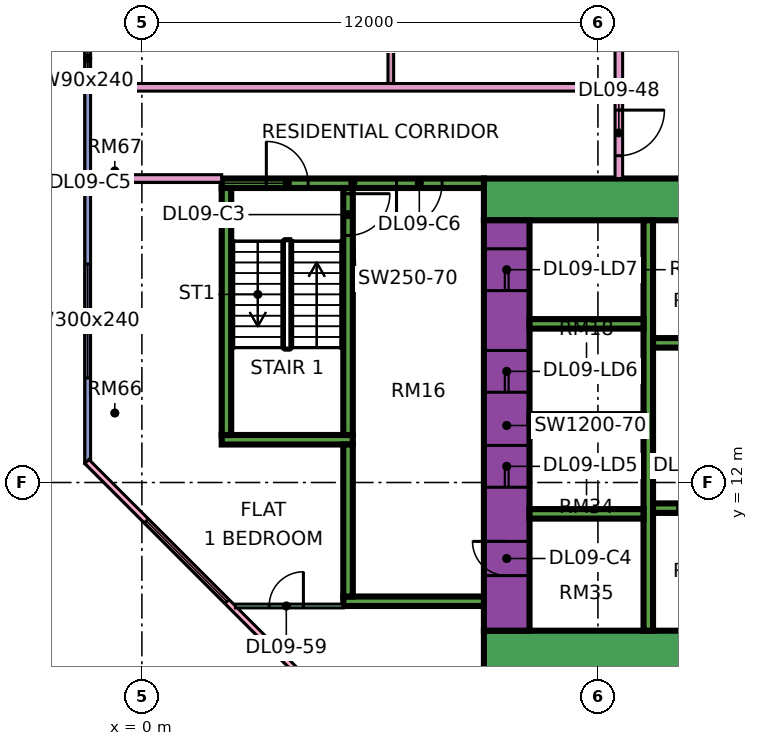
"""IFC4 building model, lengths in metres.
Left out: names, types, materials, properties, quantities, classifications, styles, units other than length and angle.
Written with IfcOpenShell. Run it as: python <this file> out.ifc"""

import sys

from ifc_helpers import new_model, si_unit, direction, frame, frame_2d, origin, place, context, subcontext, project, spatial, rectangle, extrude, element, fill, save


model = new_model("IFC4")
c1 = context("Model", 3, precision=1e-05, world=origin(), true_north=direction((0.0, 1.0)))
c2 = subcontext(c1, "Body", "Model", "MODEL_VIEW")
j1 = project(units=[si_unit("LENGTHUNIT", "METRE"), si_unit("PLANEANGLEUNIT", "RADIAN")], contexts=[c1])
p1 = place(None, origin())
s1 = spatial("IfcSite", under=j1, at=p1, CompositionType="ELEMENT")
p2 = place(p1, origin())
s2 = spatial("IfcBuilding", under=s1, at=p2, CompositionType="ELEMENT")
p3 = place(p2, frame((0.0, 0.0, 48.9)))
s3 = spatial("IfcBuildingStorey", under=s2, at=p3, CompositionType="ELEMENT", Elevation=48.9)
p4 = place(p3, frame((9.0, 7.55, 0.0), z_axis=(0.0, 0.0, 1.0), x_axis=(1.0, 0.0, 0.0)))
e1 = element("IfcWall", 1, at=p4, inside=s3, PredefinedType="SHEAR", context=c2, shape_type="SweptSolid", body=[
    extrude(rectangle(XDim=25.0, YDim=1.1, at=frame_2d((12.5, 0.0))), origin(), (0.0, 0.0, 1.0), 3.75),
])
p5 = place(p3, frame((9.0, 19.45, 0.0), z_axis=(0.0, 0.0, 1.0), x_axis=(1.0, 0.0, 0.0)))
e2 = element("IfcWall", 2, at=p5, inside=s3, PredefinedType="SHEAR", context=c2, shape_type="SweptSolid", body=[
    extrude(rectangle(XDim=25.0, YDim=1.1, at=frame_2d((12.5, 0.0))), origin(), (0.0, 0.0, 1.0), 3.75),
])
p6 = place(p5, frame((19.1, 0.0, 0.0)))
e3 = element("IfcOpeningElement", 3, at=p6, cuts=e2, PredefinedType="OPENING", context=c2, shape_type="SweptSolid", body=[
    extrude(rectangle(XDim=1.8, YDim=2.4, at=frame_2d((0.9, 1.2))), frame((0.0, 0.56, 0.0), z_axis=(0.0, -1.0, 0.0), x_axis=(1.0, 0.0, 0.0)), (0.0, 0.0, 1.0), 1.12),
])
p7 = place(p3, frame((9.6, 8.1, 0.0), z_axis=(0.0, 0.0, 1.0), x_axis=(0.0, 1.0, 0.0)))
e4 = element("IfcWall", 4, at=p7, inside=s3, PredefinedType="SHEAR", context=c2, shape_type="SweptSolid", body=[
    extrude(rectangle(XDim=10.8, YDim=1.2, at=frame_2d((5.4, 0.0))), origin(), (0.0, 0.0, 1.0), 3.75),
])
p8 = place(p7, frame((3.775, 0.0, 0.0)))
e5 = element("IfcOpeningElement", 5, at=p8, cuts=e4, PredefinedType="OPENING", context=c2, shape_type="SweptSolid", body=[
    extrude(rectangle(XDim=1.1, YDim=2.2, at=frame_2d((0.55, 1.1))), frame((0.0, 0.61, 0.0), z_axis=(0.0, -1.0, 0.0), x_axis=(1.0, 0.0, 0.0)), (0.0, 0.0, 1.0), 1.22),
])
p9 = place(p7, frame((6.275, 0.0, 0.0)))
e6 = element("IfcOpeningElement", 6, at=p9, cuts=e4, PredefinedType="OPENING", context=c2, shape_type="SweptSolid", body=[
    extrude(rectangle(XDim=1.1, YDim=2.2, at=frame_2d((0.55, 1.1))), frame((0.0, 0.61, 0.0), z_axis=(0.0, -1.0, 0.0), x_axis=(1.0, 0.0, 0.0)), (0.0, 0.0, 1.0), 1.22),
])
p10 = place(p7, frame((8.95, 0.0, 0.0)))
e7 = element("IfcOpeningElement", 7, at=p10, cuts=e4, PredefinedType="OPENING", context=c2, shape_type="SweptSolid", body=[
    extrude(rectangle(XDim=1.1, YDim=2.2, at=frame_2d((0.55, 1.1))), frame((0.0, 0.61, 0.0), z_axis=(0.0, -1.0, 0.0), x_axis=(1.0, 0.0, 0.0)), (0.0, 0.0, 1.0), 1.22),
])
p11 = place(p7, frame((1.45, 0.0, 0.0)))
e8 = element("IfcOpeningElement", 8, at=p11, cuts=e4, PredefinedType="OPENING", context=c2, shape_type="SweptSolid", body=[
    extrude(rectangle(XDim=0.9, YDim=2.1, at=frame_2d((0.45, 1.05))), frame((0.0, 0.61, 0.0), z_axis=(0.0, -1.0, 0.0), x_axis=(1.0, 0.0, 0.0)), (0.0, 0.0, 1.0), 1.22),
])
p12 = place(p3, frame((13.325, 8.1, 0.0), z_axis=(0.0, 0.0, 1.0), x_axis=(0.0, 1.0, 0.0)))
e9 = element("IfcWall", 9, at=p12, inside=s3, PredefinedType="SHEAR", context=c2, shape_type="SweptSolid", body=[
    extrude(rectangle(XDim=10.8, YDim=0.25, at=frame_2d((5.4, 0.0))), origin(), (0.0, 0.0, 1.0), 3.75),
])
p13 = place(p3, frame((13.45, 11.325, 0.0), z_axis=(0.0, 0.0, 1.0), x_axis=(1.0, 0.0, 0.0)))
e10 = element("IfcWall", 10, at=p13, inside=s3, PredefinedType="SHEAR", context=c2, shape_type="SweptSolid", body=[
    extrude(rectangle(XDim=19.45, YDim=0.25, at=frame_2d((9.725, 0.0))), origin(), (0.0, 0.0, 1.0), 3.75),
])
p14 = place(p13, frame((0.65, 0.0, 0.0)))
e11 = element("IfcOpeningElement", 11, at=p14, cuts=e10, PredefinedType="OPENING", context=c2, shape_type="SweptSolid", body=[
    extrude(rectangle(XDim=1.2, YDim=2.2, at=frame_2d((0.6, 1.1))), frame((0.0, 0.135, 0.0), z_axis=(0.0, -1.0, 0.0), x_axis=(1.0, 0.0, 0.0)), (0.0, 0.0, 1.0), 0.27),
])
p15 = place(p13, frame((3.4, 0.0, 0.0)))
e12 = element("IfcOpeningElement", 12, at=p15, cuts=e10, PredefinedType="OPENING", context=c2, shape_type="SweptSolid", body=[
    extrude(rectangle(XDim=1.2, YDim=2.2, at=frame_2d((0.6, 1.1))), frame((0.0, 0.135, 0.0), z_axis=(0.0, -1.0, 0.0), x_axis=(1.0, 0.0, 0.0)), (0.0, 0.0, 1.0), 0.27),
])
p16 = place(p13, frame((6.15, 0.0, 0.0)))
e13 = element("IfcOpeningElement", 13, at=p16, cuts=e10, PredefinedType="OPENING", context=c2, shape_type="SweptSolid", body=[
    extrude(rectangle(XDim=1.2, YDim=2.2, at=frame_2d((0.6, 1.1))), frame((0.0, 0.135, 0.0), z_axis=(0.0, -1.0, 0.0), x_axis=(1.0, 0.0, 0.0)), (0.0, 0.0, 1.0), 0.27),
])
p17 = place(p13, frame((8.9, 0.0, 0.0)))
e14 = element("IfcOpeningElement", 14, at=p17, cuts=e10, PredefinedType="OPENING", context=c2, shape_type="SweptSolid", body=[
    extrude(rectangle(XDim=1.2, YDim=2.2, at=frame_2d((0.6, 1.1))), frame((0.0, 0.135, 0.0), z_axis=(0.0, -1.0, 0.0), x_axis=(1.0, 0.0, 0.0)), (0.0, 0.0, 1.0), 0.27),
])
p18 = place(p3, frame((13.45, 15.675, 0.0), z_axis=(0.0, 0.0, 1.0), x_axis=(1.0, 0.0, 0.0)))
e15 = element("IfcWall", 15, at=p18, inside=s3, PredefinedType="SHEAR", context=c2, shape_type="SweptSolid", body=[
    extrude(rectangle(XDim=13.75, YDim=0.25, at=frame_2d((6.875, 0.0))), origin(), (0.0, 0.0, 1.0), 3.75),
])
for number, where, z_axis, x_axis in (
    (16, (10.2, 11.175, 0.0), (0.0, 0.0, 1.0), (1.0, 0.0, 0.0)),
    (17, (10.2, 13.675, 0.0), (0.0, 0.0, 1.0), (1.0, 0.0, 0.0)),
    (18, (10.2, 16.175, 0.0), (0.0, 0.0, 1.0), (1.0, 0.0, 0.0)),
):
    element("IfcWall", number, at=place(p3, frame(where, z_axis=z_axis, x_axis=x_axis)), inside=s3, PredefinedType="SHEAR", context=c2, shape_type="SweptSolid", body=[
        extrude(rectangle(XDim=3.0, YDim=0.25, at=frame_2d((1.5, 0.0))), origin(), (0.0, 0.0, 1.0), 3.75),
    ])
p19 = place(p3, frame((2.1, 19.875, 0.0), z_axis=(0.0, 0.0, 1.0), x_axis=(1.0, 0.0, 0.0)))
e19 = element("IfcWall", 19, at=p19, inside=s3, PredefinedType="SHEAR", context=c2, shape_type="SweptSolid", body=[
    extrude(rectangle(XDim=6.9, YDim=0.25, at=frame_2d((3.45, 0.0))), origin(), (0.0, 0.0, 1.0), 3.75),
])
p20 = place(p19, frame((1.175, 0.0, 0.0)))
e20 = element("IfcOpeningElement", 20, at=p20, cuts=e19, PredefinedType="OPENING", context=c2, shape_type="SweptSolid", body=[
    extrude(rectangle(XDim=1.1, YDim=2.2, at=frame_2d((0.55, 1.1))), frame((0.0, 0.135, 0.0), z_axis=(0.0, -1.0, 0.0), x_axis=(1.0, 0.0, 0.0)), (0.0, 0.0, 1.0), 0.27),
])
p21 = place(p19, frame((4.6, 0.0, 0.0)))
e21 = element("IfcOpeningElement", 21, at=p21, cuts=e19, PredefinedType="OPENING", context=c2, shape_type="SweptSolid", body=[
    extrude(rectangle(XDim=1.2, YDim=2.2, at=frame_2d((0.6, 1.1))), frame((0.0, 0.135, 0.0), z_axis=(0.0, -1.0, 0.0), x_axis=(1.0, 0.0, 0.0)), (0.0, 0.0, 1.0), 0.27),
])
p22 = place(p3, frame((2.1, 13.125, 0.0), z_axis=(0.0, 0.0, 1.0), x_axis=(1.0, 0.0, 0.0)))
e22 = element("IfcWall", 22, at=p22, inside=s3, PredefinedType="SHEAR", context=c2, shape_type="SweptSolid", body=[
    extrude(rectangle(XDim=3.45, YDim=0.25, at=frame_2d((1.725, 0.0))), origin(), (0.0, 0.0, 1.0), 3.75),
])
p23 = place(p3, frame((2.225, 13.25, 0.0), z_axis=(0.0, 0.0, 1.0), x_axis=(0.0, 1.0, 0.0)))
e23 = element("IfcWall", 23, at=p23, inside=s3, PredefinedType="SHEAR", context=c2, shape_type="SweptSolid", body=[
    extrude(rectangle(XDim=6.5, YDim=0.25, at=frame_2d((3.25, 0.0))), origin(), (0.0, 0.0, 1.0), 3.75),
])
p24 = place(p3, frame((5.425, 13.25, 0.0), z_axis=(0.0, 0.0, 1.0), x_axis=(0.0, 1.0, 0.0)))
e24 = element("IfcWall", 24, at=p24, inside=s3, PredefinedType="SHEAR", context=c2, shape_type="SweptSolid", body=[
    extrude(rectangle(XDim=6.5, YDim=0.25, at=frame_2d((3.25, 0.0))), origin(), (0.0, 0.0, 1.0), 3.75),
])
p25 = place(p24, frame((5.25, 0.0, 0.0)))
e25 = element("IfcOpeningElement", 25, at=p25, cuts=e24, PredefinedType="OPENING", context=c2, shape_type="SweptSolid", body=[
    extrude(rectangle(XDim=1.1, YDim=2.2, at=frame_2d((0.55, 1.1))), frame((0.0, 0.135, 0.0), z_axis=(0.0, -1.0, 0.0), x_axis=(1.0, 0.0, 0.0)), (0.0, 0.0, 1.0), 0.27),
])
p26 = place(p3, frame((5.3, 8.875, 0.0), z_axis=(0.0, 0.0, 1.0), x_axis=(1.0, 0.0, 0.0)))
e26 = element("IfcWall", 26, at=p26, inside=s3, PredefinedType="SHEAR", context=c2, shape_type="SweptSolid", body=[
    extrude(rectangle(XDim=3.7, YDim=0.25, at=frame_2d((1.85, 0.0))), origin(), (0.0, 0.0, 1.0), 3.75),
])
p27 = place(p3, frame((5.425, 9.0, 0.0), z_axis=(0.0, 0.0, 1.0), x_axis=(0.0, 1.0, 0.0)))
e27 = element("IfcWall", 27, at=p27, inside=s3, PredefinedType="SHEAR", context=c2, shape_type="SweptSolid", body=[
    extrude(rectangle(XDim=4.0, YDim=0.25, at=frame_2d((2.0, 0.0))), origin(), (0.0, 0.0, 1.0), 3.75),
])
p28 = place(p3, frame((-1.425, 23.925, 0.0), z_axis=(0.0, 0.0, 1.0), x_axis=(0.0, -1.0, 0.0)))
e28 = element("IfcWall", 28, at=p28, inside=s3, PredefinedType="SOLIDWALL", context=c2, shape_type="SweptSolid", body=[
    extrude(rectangle(XDim=11.425, YDim=0.15, at=frame_2d((5.712, 0.0))), origin(), (0.0, 0.0, 1.0), 3.35),
])
p29 = place(p28, frame((0.312, 0.0, 0.45)))
e29 = element("IfcOpeningElement", 29, at=p29, cuts=e28, PredefinedType="OPENING", context=c2, shape_type="SweptSolid", body=[
    extrude(rectangle(XDim=0.9, YDim=2.4, at=frame_2d((0.45, 1.2))), frame((0.0, 0.085, 0.0), z_axis=(0.0, -1.0, 0.0), x_axis=(1.0, 0.0, 0.0)), (0.0, 0.0, 1.0), 0.17),
])
p30 = place(p28, frame((6.175, 0.0, 0.45)))
e30 = element("IfcOpeningElement", 30, at=p30, cuts=e28, PredefinedType="OPENING", context=c2, shape_type="SweptSolid", body=[
    extrude(rectangle(XDim=3.0, YDim=2.4, at=frame_2d((1.5, 1.2))), frame((0.0, 0.085, 0.0), z_axis=(0.0, -1.0, 0.0), x_axis=(1.0, 0.0, 0.0)), (0.0, 0.0, 1.0), 0.17),
])
p31 = place(p3, frame((-1.447, 12.553, 0.0), z_axis=(0.0, 0.0, 1.0), x_axis=(0.707106781187, -0.707106781187, 0.0)))
e31 = element("IfcWall", 31, at=p31, inside=s3, PredefinedType="SOLIDWALL", context=c2, shape_type="SweptSolid", body=[
    extrude(rectangle(XDim=19.799, YDim=0.15, at=frame_2d((9.899, 0.0))), origin(), (0.0, 0.0, 1.0), 3.35),
])
p32 = place(p31, frame((2.212, 0.0, 0.45)))
e32 = element("IfcOpeningElement", 32, at=p32, cuts=e31, PredefinedType="OPENING", context=c2, shape_type="SweptSolid", body=[
    extrude(rectangle(XDim=3.0, YDim=2.4, at=frame_2d((1.5, 1.2))), frame((0.0, 0.085, 0.0), z_axis=(0.0, -1.0, 0.0), x_axis=(1.0, 0.0, 0.0)), (0.0, 0.0, 1.0), 0.17),
])
p33 = place(p31, frame((10.216, 0.0, 0.45)))
e33 = element("IfcOpeningElement", 33, at=p33, cuts=e31, PredefinedType="OPENING", context=c2, shape_type="SweptSolid", body=[
    extrude(rectangle(XDim=3.0, YDim=2.4, at=frame_2d((1.5, 1.2))), frame((0.0, 0.085, 0.0), z_axis=(0.0, -1.0, 0.0), x_axis=(1.0, 0.0, 0.0)), (0.0, 0.0, 1.0), 0.17),
])
p34 = place(p3, frame((-1.35, 20.0, 0.0), z_axis=(0.0, 0.0, 1.0), x_axis=(1.0, 0.0, 0.0)))
e34 = element("IfcWall", 34, at=p34, inside=s3, PredefinedType="PARTITIONING", context=c2, shape_type="SweptSolid", body=[
    extrude(rectangle(XDim=3.45, YDim=0.2, at=frame_2d((1.725, 0.0))), origin(), (0.0, 0.0, 1.0), 3.35),
])
p35 = place(p3, frame((-1.35, 22.4, 0.0), z_axis=(0.0, 0.0, 1.0), x_axis=(1.0, 0.0, 0.0)))
e35 = element("IfcWall", 35, at=p35, inside=s3, PredefinedType="PARTITIONING", context=c2, shape_type="SweptSolid", body=[
    extrude(rectangle(XDim=13.8, YDim=0.2, at=frame_2d((6.9, 0.0))), origin(), (0.0, 0.0, 1.0), 3.35),
])
p36 = place(p3, frame((2.461, 8.75, 0.0), z_axis=(0.0, 0.0, 1.0), x_axis=(1.0, 0.0, 0.0)))
e36 = element("IfcWall", 36, at=p36, inside=s3, PredefinedType="PARTITIONING", context=c2, shape_type="SweptSolid", body=[
    extrude(rectangle(XDim=2.839, YDim=0.1, at=frame_2d((1.419, 0.0))), origin(), (0.0, 0.0, 1.0), 3.35),
])
p37 = place(p36, frame((0.889, 0.0, 0.0)))
e37 = element("IfcOpeningElement", 37, at=p37, cuts=e36, PredefinedType="OPENING", context=c2, shape_type="SweptSolid", body=[
    extrude(rectangle(XDim=0.9, YDim=2.1, at=frame_2d((0.45, 1.05))), frame((0.0, 0.06, 0.0), z_axis=(0.0, -1.0, 0.0), x_axis=(1.0, 0.0, 0.0)), (0.0, 0.0, 1.0), 0.12),
])
p38 = place(p3, frame((6.55, 22.5, 0.0), z_axis=(0.0, 0.0, 1.0), x_axis=(0.0, 1.0, 0.0)))
e38 = element("IfcWall", 38, at=p38, inside=s3, PredefinedType="PARTITIONING", context=c2, shape_type="SweptSolid", body=[
    extrude(rectangle(XDim=10.55, YDim=0.15, at=frame_2d((5.275, 0.0))), origin(), (0.0, 0.0, 1.0), 3.35),
])
p39 = place(p38, frame((1.8, 0.0, 0.0)))
e39 = element("IfcOpeningElement", 39, at=p39, cuts=e38, PredefinedType="OPENING", context=c2, shape_type="SweptSolid", body=[
    extrude(rectangle(XDim=0.9, YDim=2.1, at=frame_2d((0.45, 1.05))), frame((0.0, 0.085, 0.0), z_axis=(0.0, -1.0, 0.0), x_axis=(1.0, 0.0, 0.0)), (0.0, 0.0, 1.0), 0.17),
])
p40 = place(p3, frame((12.55, 20.0, 0.0), z_axis=(0.0, 0.0, 1.0), x_axis=(0.0, 1.0, 0.0)))
e40 = element("IfcWall", 40, at=p40, inside=s3, PredefinedType="PARTITIONING", context=c2, shape_type="SweptSolid", body=[
    extrude(rectangle(XDim=19.0, YDim=0.2, at=frame_2d((9.5, 0.0))), origin(), (0.0, 0.0, 1.0), 3.35),
])
p41 = place(p40, frame((0.6, 0.0, 0.0)))
e41 = element("IfcOpeningElement", 41, at=p41, cuts=e40, PredefinedType="OPENING", context=c2, shape_type="SweptSolid", body=[
    extrude(rectangle(XDim=1.2, YDim=2.1, at=frame_2d((0.6, 1.05))), frame((0.0, 0.11, 0.0), z_axis=(0.0, -1.0, 0.0), x_axis=(1.0, 0.0, 0.0)), (0.0, 0.0, 1.0), 0.22),
])
p42 = place(p40, frame((4.65, 0.0, 0.0)))
e42 = element("IfcOpeningElement", 42, at=p42, cuts=e40, PredefinedType="OPENING", context=c2, shape_type="SweptSolid", body=[
    extrude(rectangle(XDim=1.0, YDim=2.1, at=frame_2d((0.5, 1.05))), frame((0.0, 0.11, 0.0), z_axis=(0.0, -1.0, 0.0), x_axis=(1.0, 0.0, 0.0)), (0.0, 0.0, 1.0), 0.22),
])
p43 = place(p29, origin())
e43 = element("IfcWindow", 43, at=p43, inside=s3, PartitioningType="SINGLE_PANEL", PredefinedType="WINDOW", context=c2, shape_type="SweptSolid", body=[
    extrude(rectangle(XDim=0.9, YDim=2.4, at=frame_2d((0.45, 1.2))), frame((0.0, 0.03, 0.0), z_axis=(0.0, -1.0, 0.0), x_axis=(1.0, 0.0, 0.0)), (0.0, 0.0, 1.0), 0.06),
])
fill(e29, e43)
p44 = place(p30, origin())
e44 = element("IfcWindow", 44, at=p44, inside=s3, PartitioningType="SINGLE_PANEL", PredefinedType="WINDOW", context=c2, shape_type="SweptSolid", body=[
    extrude(rectangle(XDim=3.0, YDim=2.4, at=frame_2d((1.5, 1.2))), frame((0.0, 0.03, 0.0), z_axis=(0.0, -1.0, 0.0), x_axis=(1.0, 0.0, 0.0)), (0.0, 0.0, 1.0), 0.06),
])
fill(e30, e44)
p45 = place(p32, origin())
e45 = element("IfcWindow", 45, at=p45, inside=s3, PartitioningType="SINGLE_PANEL", PredefinedType="WINDOW", context=c2, shape_type="SweptSolid", body=[
    extrude(rectangle(XDim=3.0, YDim=2.4, at=frame_2d((1.5, 1.2))), frame((0.0, 0.03, 0.0), z_axis=(0.0, -1.0, 0.0), x_axis=(1.0, 0.0, 0.0)), (0.0, 0.0, 1.0), 0.06),
])
fill(e32, e45)
p46 = place(p14, origin())
e46 = element("IfcDoor", 46, at=p46, inside=s3, OperationType="DOUBLE_DOOR_SLIDING", PredefinedType="DOOR", context=c2, shape_type="SweptSolid", body=[
    extrude(rectangle(XDim=1.2, YDim=2.2, at=frame_2d((0.6, 1.1))), frame((0.0, 0.025, 0.0), z_axis=(0.0, -1.0, 0.0), x_axis=(1.0, 0.0, 0.0)), (0.0, 0.0, 1.0), 0.05),
])
fill(e11, e46)
p47 = place(p8, origin())
e47 = element("IfcDoor", 47, at=p47, inside=s3, OperationType="DOUBLE_DOOR_SLIDING", PredefinedType="DOOR", context=c2, shape_type="SweptSolid", body=[
    extrude(rectangle(XDim=1.1, YDim=2.2, at=frame_2d((0.55, 1.1))), frame((0.0, 0.025, 0.0), z_axis=(0.0, -1.0, 0.0), x_axis=(1.0, 0.0, 0.0)), (0.0, 0.0, 1.0), 0.05),
])
fill(e5, e47)
p48 = place(p9, origin())
e48 = element("IfcDoor", 48, at=p48, inside=s3, OperationType="DOUBLE_DOOR_SLIDING", PredefinedType="DOOR", context=c2, shape_type="SweptSolid", body=[
    extrude(rectangle(XDim=1.1, YDim=2.2, at=frame_2d((0.55, 1.1))), frame((0.0, 0.025, 0.0), z_axis=(0.0, -1.0, 0.0), x_axis=(1.0, 0.0, 0.0)), (0.0, 0.0, 1.0), 0.05),
])
fill(e6, e48)
p49 = place(p10, origin())
e49 = element("IfcDoor", 49, at=p49, inside=s3, OperationType="DOUBLE_DOOR_SLIDING", PredefinedType="DOOR", context=c2, shape_type="SweptSolid", body=[
    extrude(rectangle(XDim=1.1, YDim=2.2, at=frame_2d((0.55, 1.1))), frame((0.0, 0.025, 0.0), z_axis=(0.0, -1.0, 0.0), x_axis=(1.0, 0.0, 0.0)), (0.0, 0.0, 1.0), 0.05),
])
fill(e7, e49)
p50 = place(p25, origin())
e50 = element("IfcDoor", 50, at=p50, inside=s3, OperationType="SINGLE_SWING_RIGHT", PredefinedType="DOOR", context=c2, shape_type="SweptSolid", body=[
    extrude(rectangle(XDim=1.1, YDim=2.2, at=frame_2d((0.55, 1.1))), frame((0.0, 0.025, 0.0), z_axis=(0.0, -1.0, 0.0), x_axis=(1.0, 0.0, 0.0)), (0.0, 0.0, 1.0), 0.05),
])
fill(e25, e50)
p51 = place(p11, frame((0.9, 0.0, 0.0), z_axis=(0.0, 0.0, 1.0), x_axis=(-1.0, 0.0, 0.0)))
e51 = element("IfcDoor", 51, at=p51, inside=s3, OperationType="SINGLE_SWING_RIGHT", PredefinedType="DOOR", context=c2, shape_type="SweptSolid", body=[
    extrude(rectangle(XDim=0.9, YDim=2.1, at=frame_2d((0.45, 1.05))), frame((0.0, 0.025, 0.0), z_axis=(0.0, -1.0, 0.0), x_axis=(1.0, 0.0, 0.0)), (0.0, 0.0, 1.0), 0.05),
])
fill(e8, e51)
p52 = place(p20, origin())
e52 = element("IfcDoor", 52, at=p52, inside=s3, OperationType="SINGLE_SWING_LEFT", PredefinedType="DOOR", context=c2, shape_type="SweptSolid", body=[
    extrude(rectangle(XDim=1.1, YDim=2.2, at=frame_2d((0.55, 1.1))), frame((0.0, 0.025, 0.0), z_axis=(0.0, -1.0, 0.0), x_axis=(1.0, 0.0, 0.0)), (0.0, 0.0, 1.0), 0.05),
])
fill(e20, e52)
p53 = place(p21, frame((1.2, 0.0, 0.0), z_axis=(0.0, 0.0, 1.0), x_axis=(-1.0, 0.0, 0.0)))
e53 = element("IfcDoor", 53, at=p53, inside=s3, OperationType="SINGLE_SWING_LEFT", PredefinedType="DOOR", context=c2, shape_type="SweptSolid", body=[
    extrude(rectangle(XDim=1.2, YDim=2.2, at=frame_2d((0.6, 1.1))), frame((0.0, 0.025, 0.0), z_axis=(0.0, -1.0, 0.0), x_axis=(1.0, 0.0, 0.0)), (0.0, 0.0, 1.0), 0.05),
])
fill(e21, e53)
p54 = place(p41, origin())
e54 = element("IfcDoor", 54, at=p54, inside=s3, OperationType="SINGLE_SWING_RIGHT", PredefinedType="DOOR", context=c2, shape_type="SweptSolid", body=[
    extrude(rectangle(XDim=1.2, YDim=2.1, at=frame_2d((0.6, 1.05))), frame((0.0, 0.025, 0.0), z_axis=(0.0, -1.0, 0.0), x_axis=(1.0, 0.0, 0.0)), (0.0, 0.0, 1.0), 0.05),
])
fill(e41, e54)
p55 = place(p37, frame((0.9, 0.0, 0.0), z_axis=(0.0, 0.0, 1.0), x_axis=(-1.0, 0.0, 0.0)))
e55 = element("IfcDoor", 55, at=p55, inside=s3, OperationType="SINGLE_SWING_RIGHT", PredefinedType="DOOR", context=c2, shape_type="SweptSolid", body=[
    extrude(rectangle(XDim=0.9, YDim=2.1, at=frame_2d((0.45, 1.05))), frame((0.0, 0.025, 0.0), z_axis=(0.0, -1.0, 0.0), x_axis=(1.0, 0.0, 0.0)), (0.0, 0.0, 1.0), 0.05),
])
fill(e37, e55)
save(model, sys.argv[1])
